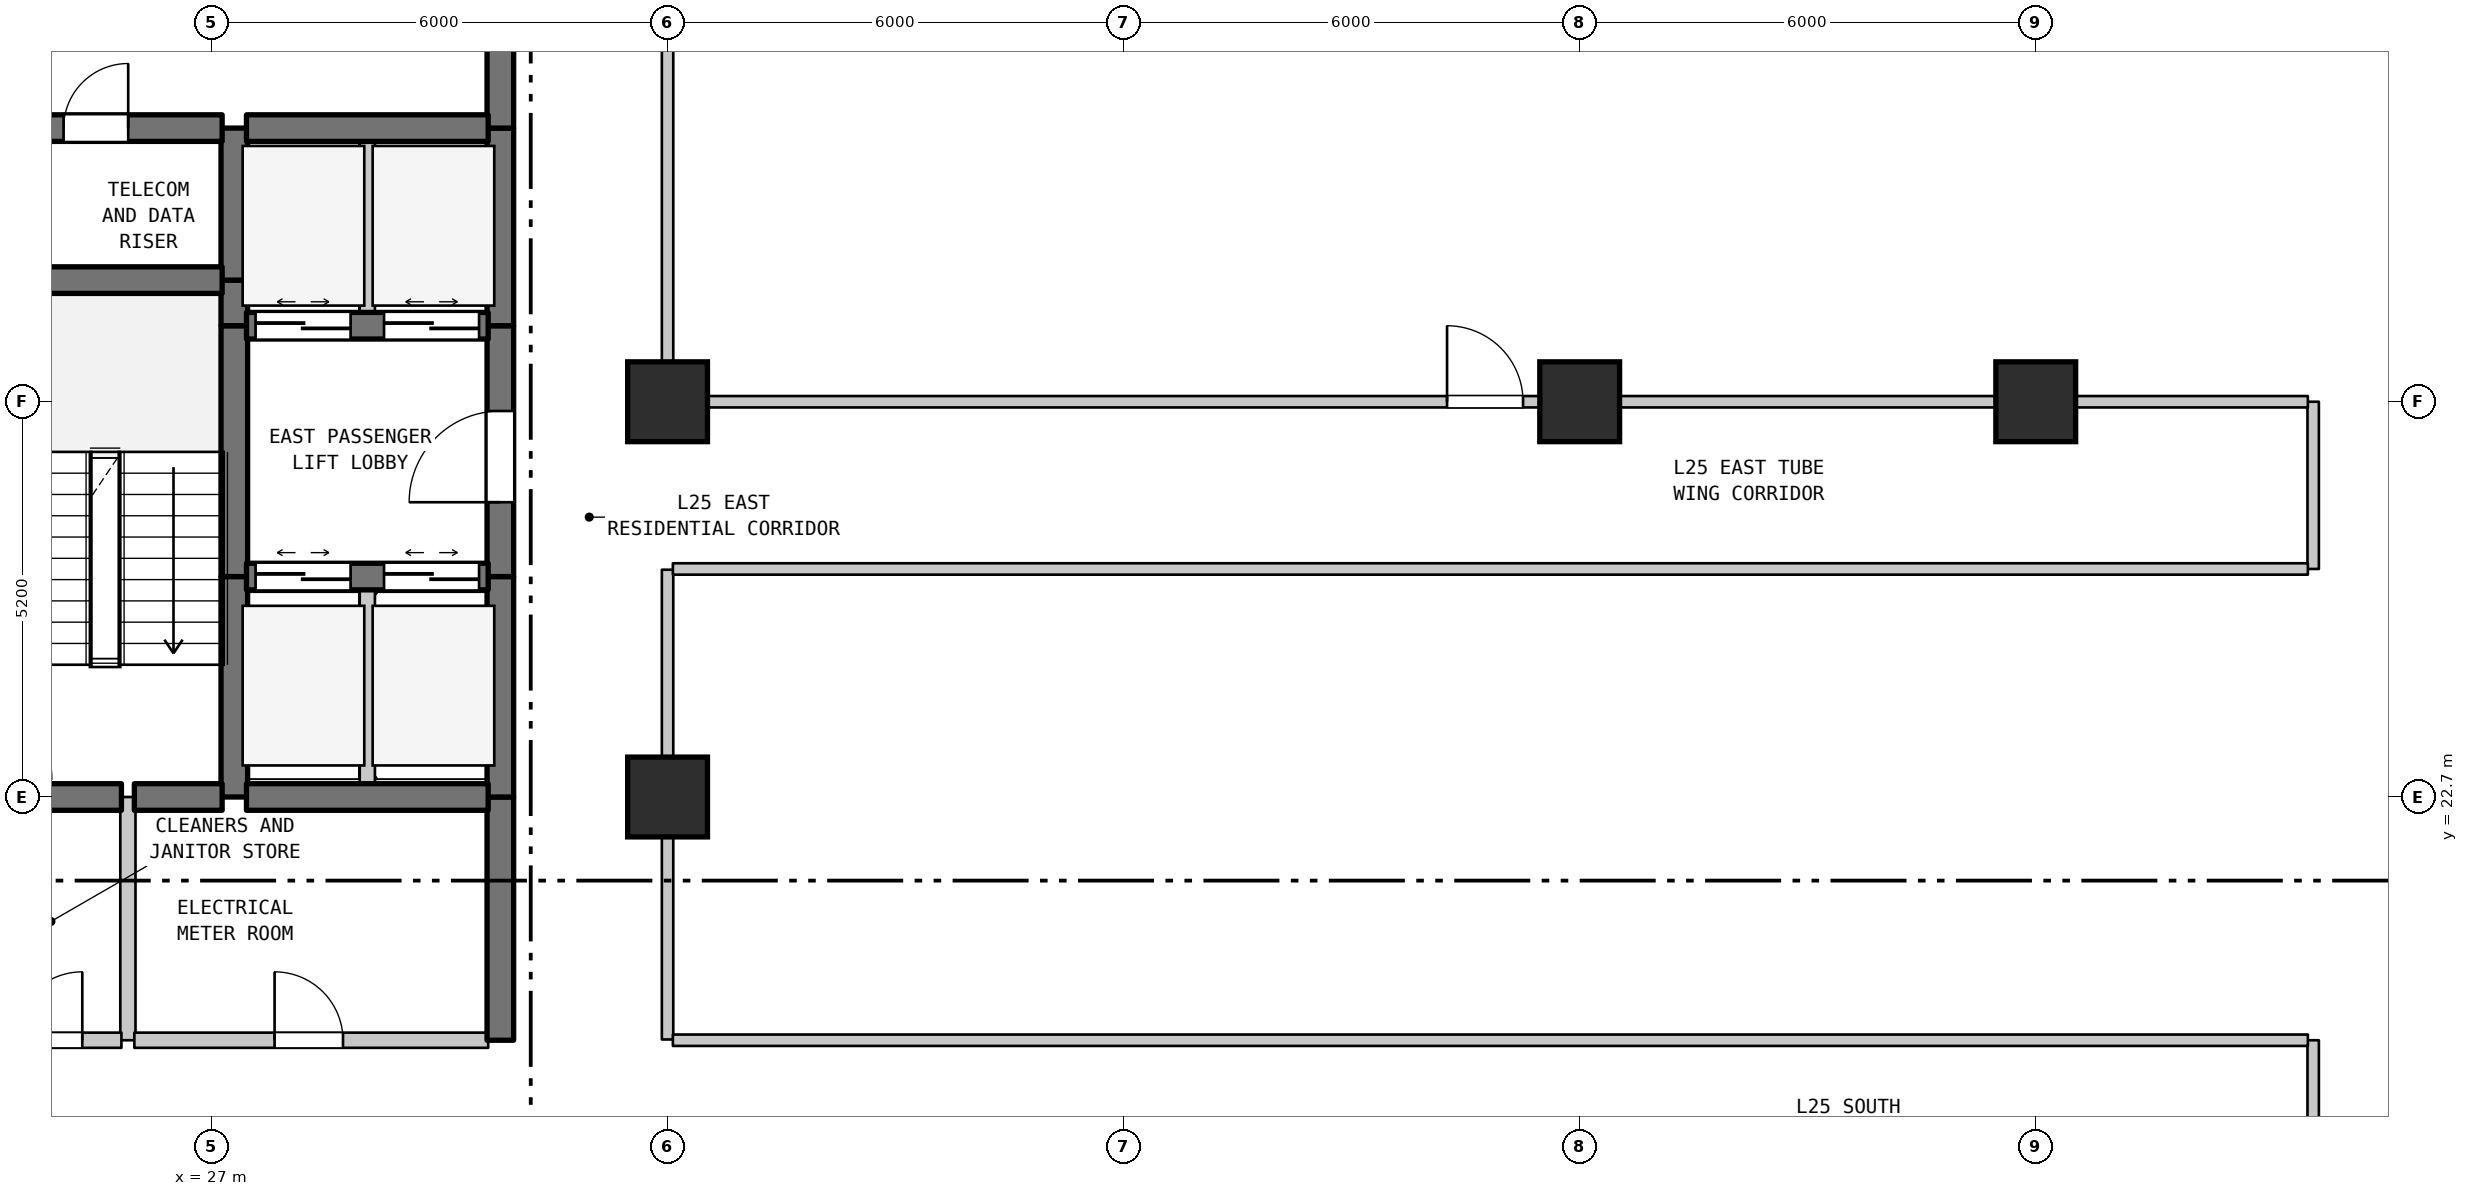
"""IFC4 building model, lengths in metres.
Left out: names, types, materials, properties, quantities, classifications, styles, units other than length and angle.
Written with IfcOpenShell. Run it as: python <this file> out.ifc"""

import sys

from ifc_helpers import new_model, si_unit, direction, frame, frame_2d, origin, origin_2d, place, context, subcontext, project, spatial, rectangle, extrude, element, fill, save


model = new_model("IFC4")
c1 = context("Model", 3, precision=1e-05, world=origin(), true_north=direction((0.0, 1.0)))
c2 = subcontext(c1, "Body", "Model", "MODEL_VIEW")
j1 = project(units=[si_unit("LENGTHUNIT", "METRE"), si_unit("PLANEANGLEUNIT", "RADIAN")], contexts=[c1])
p1 = place(None, origin())
s1 = spatial("IfcSite", under=j1, at=p1, CompositionType="ELEMENT")
p2 = place(p1, origin())
s2 = spatial("IfcBuilding", under=s1, at=p2, CompositionType="ELEMENT")
p3 = place(p2, frame((0.0, 0.0, 105.7)))
s3 = spatial("IfcBuildingStorey", under=s2, at=p3, CompositionType="ELEMENT", Elevation=105.7)
for number, where, z_axis, x_axis in (
    (1, (33.0, 22.7, 0.0), (0.0, 0.0, 1.0), (1.0, 0.0, 0.0)),
    (2, (33.0, 27.9, 0.0), (0.0, 0.0, 1.0), (1.0, 0.0, 0.0)),
    (3, (45.0, 27.9, 0.0), (0.0, 0.0, 1.0), (1.0, 0.0, 0.0)),
    (4, (51.0, 27.9, 0.0), (0.0, 0.0, 1.0), (1.0, 0.0, 0.0)),
):
    element("IfcColumn", number, at=place(p3, frame(where, z_axis=z_axis, x_axis=x_axis)), inside=s3, PredefinedType="COLUMN", context=c2, shape_type="SweptSolid", body=[
        extrude(rectangle(XDim=1.05, YDim=1.05, at=origin_2d()), origin(), (0.0, 0.0, 1.0), 3.7),
    ])
p4 = place(p3, frame((25.9, 19.5, 0.0), z_axis=(0.0, 0.0, 1.0), x_axis=(0.0, 1.0, 0.0)))
e5 = element("IfcWall", 5, at=p4, inside=s3, PredefinedType="STANDARD", context=c2, shape_type="SweptSolid", body=[
    extrude(rectangle(XDim=3.2, YDim=0.2, at=frame_2d((1.6, 0.0))), origin(), (0.0, 0.0, 1.0), 3.385),
])
p5 = place(p3, frame((27.3, 22.7, 0.0), z_axis=(0.0, 0.0, 1.0), x_axis=(0.0, 1.0, 0.0)))
e6 = element("IfcWall", 6, at=p5, inside=s3, PredefinedType="SHEAR", context=c2, shape_type="SweptSolid", body=[
    extrude(rectangle(XDim=2.9, YDim=0.35, at=frame_2d((1.45, 0.0))), origin(), (0.0, 0.0, 1.0), 3.385),
])
p6 = place(p3, frame((27.3, 25.6, 0.0), z_axis=(0.0, 0.0, 1.0), x_axis=(0.0, 1.0, 0.0)))
e7 = element("IfcWall", 7, at=p6, inside=s3, PredefinedType="SHEAR", context=c2, shape_type="SweptSolid", body=[
    extrude(rectangle(XDim=3.3, YDim=0.35, at=frame_2d((1.65, 0.0))), origin(), (0.0, 0.0, 1.0), 3.385),
])
p7 = place(p3, frame((27.3, 28.9, 0.0), z_axis=(0.0, 0.0, 1.0), x_axis=(0.0, 1.0, 0.0)))
e8 = element("IfcWall", 8, at=p7, inside=s3, PredefinedType="SHEAR", context=c2, shape_type="SweptSolid", body=[
    extrude(rectangle(XDim=0.6, YDim=0.35, at=frame_2d((0.3, 0.0))), origin(), (0.0, 0.0, 1.0), 3.385),
])
p8 = place(p3, frame((27.3, 29.5, 0.0), z_axis=(0.0, 0.0, 1.0), x_axis=(0.0, 1.0, 0.0)))
e9 = element("IfcWall", 9, at=p8, inside=s3, PredefinedType="SHEAR", context=c2, shape_type="SweptSolid", body=[
    extrude(rectangle(XDim=2.0, YDim=0.35, at=frame_2d((1.0, 0.0))), origin(), (0.0, 0.0, 1.0), 3.385),
])
p9 = place(p3, frame((29.05, 22.7, 0.0), z_axis=(0.0, 0.0, 1.0), x_axis=(0.0, 1.0, 0.0)))
e10 = element("IfcWall", 10, at=p9, inside=s3, PredefinedType="STANDARD", context=c2, shape_type="SweptSolid", body=[
    extrude(rectangle(XDim=2.9, YDim=0.2, at=frame_2d((1.45, 0.0))), origin(), (0.0, 0.0, 1.0), 3.385),
])
p10 = place(p3, frame((29.05, 28.9, 0.0), z_axis=(0.0, 0.0, 1.0), x_axis=(0.0, 1.0, 0.0)))
e11 = element("IfcWall", 11, at=p10, inside=s3, PredefinedType="STANDARD", context=c2, shape_type="SweptSolid", body=[
    extrude(rectangle(XDim=2.6, YDim=0.2, at=frame_2d((1.3, 0.0))), origin(), (0.0, 0.0, 1.0), 3.385),
])
p11 = place(p3, frame((30.8, 19.5, 0.0), z_axis=(0.0, 0.0, 1.0), x_axis=(0.0, 1.0, 0.0)))
e12 = element("IfcWall", 12, at=p11, inside=s3, PredefinedType="SHEAR", context=c2, shape_type="SweptSolid", body=[
    extrude(rectangle(XDim=3.2, YDim=0.35, at=frame_2d((1.6, 0.0))), origin(), (0.0, 0.0, 1.0), 3.385),
])
p12 = place(p3, frame((30.8, 22.7, 0.0), z_axis=(0.0, 0.0, 1.0), x_axis=(0.0, 1.0, 0.0)))
e13 = element("IfcWall", 13, at=p12, inside=s3, PredefinedType="SHEAR", context=c2, shape_type="SweptSolid", body=[
    extrude(rectangle(XDim=2.9, YDim=0.35, at=frame_2d((1.45, 0.0))), origin(), (0.0, 0.0, 1.0), 3.385),
])
p13 = place(p3, frame((30.8, 25.6, 0.0), z_axis=(0.0, 0.0, 1.0), x_axis=(0.0, 1.0, 0.0)))
e14 = element("IfcWall", 14, at=p13, inside=s3, PredefinedType="SHEAR", context=c2, shape_type="SweptSolid", body=[
    extrude(rectangle(XDim=3.3, YDim=0.35, at=frame_2d((1.65, 0.0))), origin(), (0.0, 0.0, 1.0), 3.385),
])
p14 = place(p13, frame((0.978, 0.0, 0.0)))
e15 = element("IfcOpeningElement", 15, at=p14, cuts=e14, PredefinedType="OPENING", context=c2, shape_type="SweptSolid", body=[
    extrude(rectangle(XDim=1.2, YDim=2.2, at=frame_2d((0.6, 1.1))), frame((0.0, 0.185, 0.0), z_axis=(0.0, -1.0, 0.0), x_axis=(1.0, 0.0, 0.0)), (0.0, 0.0, 1.0), 0.37),
])
p15 = place(p3, frame((30.8, 28.9, 0.0), z_axis=(0.0, 0.0, 1.0), x_axis=(0.0, 1.0, 0.0)))
e16 = element("IfcWall", 16, at=p15, inside=s3, PredefinedType="SHEAR", context=c2, shape_type="SweptSolid", body=[
    extrude(rectangle(XDim=2.6, YDim=0.35, at=frame_2d((1.3, 0.0))), origin(), (0.0, 0.0, 1.0), 3.385),
])
p16 = place(p3, frame((30.8, 31.5, 0.0), z_axis=(0.0, 0.0, 1.0), x_axis=(0.0, 1.0, 0.0)))
e17 = element("IfcWall", 17, at=p16, inside=s3, PredefinedType="SHEAR", context=c2, shape_type="SweptSolid", body=[
    extrude(rectangle(XDim=3.5, YDim=0.35, at=frame_2d((1.75, 0.0))), origin(), (0.0, 0.0, 1.0), 3.385),
])
p17 = place(p16, frame((1.15, 0.0, 0.0)))
e18 = element("IfcOpeningElement", 18, at=p17, cuts=e17, PredefinedType="OPENING", context=c2, shape_type="SweptSolid", body=[
    extrude(rectangle(XDim=1.2, YDim=2.2, at=frame_2d((0.6, 1.1))), frame((0.0, 0.185, 0.0), z_axis=(0.0, -1.0, 0.0), x_axis=(1.0, 0.0, 0.0)), (0.0, 0.0, 1.0), 0.37),
])
p18 = place(p3, frame((33.0, 19.51, 0.0), z_axis=(0.0, 0.0, 1.0), x_axis=(0.0, 1.0, 0.0)))
e19 = element("IfcWall", 19, at=p18, inside=s3, PredefinedType="STANDARD", context=c2, shape_type="SweptSolid", body=[
    extrude(rectangle(XDim=6.18, YDim=0.15, at=frame_2d((3.09, 0.0))), origin(), (0.0, 0.0, 1.0), 2.935),
])
p19 = place(p3, frame((33.0, 27.91, 0.0), z_axis=(0.0, 0.0, 1.0), x_axis=(0.0, 1.0, 0.0)))
e20 = element("IfcWall", 20, at=p19, inside=s3, PredefinedType="STANDARD", context=c2, shape_type="SweptSolid", body=[
    extrude(rectangle(XDim=9.98, YDim=0.15, at=frame_2d((4.99, 0.0))), origin(), (0.0, 0.0, 1.0), 2.885),
])
p20 = place(p3, frame((54.65, 17.31, 0.0), z_axis=(0.0, 0.0, 1.0), x_axis=(0.0, 1.0, 0.0)))
e21 = element("IfcWall", 21, at=p20, inside=s3, PredefinedType="STANDARD", context=c2, shape_type="SweptSolid", body=[
    extrude(rectangle(XDim=2.19, YDim=0.15, at=frame_2d((1.095, 0.0))), origin(), (0.0, 0.0, 1.0), 3.385),
])
p21 = place(p3, frame((54.65, 25.7, 0.0), z_axis=(0.0, 0.0, 1.0), x_axis=(0.0, 1.0, 0.0)))
e22 = element("IfcWall", 22, at=p21, inside=s3, PredefinedType="STANDARD", context=c2, shape_type="SweptSolid", body=[
    extrude(rectangle(XDim=2.2, YDim=0.15, at=frame_2d((1.1, 0.0))), origin(), (0.0, 0.0, 1.0), 3.385),
])
p22 = place(p3, frame((23.96, 19.5, 0.0), z_axis=(0.0, 0.0, 1.0), x_axis=(1.0, 0.0, 0.0)))
e23 = element("IfcWall", 23, at=p22, inside=s3, PredefinedType="STANDARD", context=c2, shape_type="SweptSolid", body=[
    extrude(rectangle(XDim=1.855, YDim=0.2, at=frame_2d((0.927, 0.0))), origin(), (0.0, 0.0, 1.0), 3.385),
])
p23 = place(p22, frame((0.44, 0.0, 0.0)))
e24 = element("IfcOpeningElement", 24, at=p23, cuts=e23, PredefinedType="OPENING", context=c2, shape_type="SweptSolid", body=[
    extrude(rectangle(XDim=0.9, YDim=2.15, at=frame_2d((0.45, 1.075))), frame((0.0, 0.11, 0.0), z_axis=(0.0, -1.0, 0.0), x_axis=(1.0, 0.0, 0.0)), (0.0, 0.0, 1.0), 0.22),
])
p24 = place(p3, frame((25.985, 19.5, 0.0), z_axis=(0.0, 0.0, 1.0), x_axis=(1.0, 0.0, 0.0)))
e25 = element("IfcWall", 25, at=p24, inside=s3, PredefinedType="STANDARD", context=c2, shape_type="SweptSolid", body=[
    extrude(rectangle(XDim=4.655, YDim=0.2, at=frame_2d((2.327, 0.0))), origin(), (0.0, 0.0, 1.0), 3.385),
])
p25 = place(p24, frame((1.845, 0.0, 0.0)))
e26 = element("IfcOpeningElement", 26, at=p25, cuts=e25, PredefinedType="OPENING", context=c2, shape_type="SweptSolid", body=[
    extrude(rectangle(XDim=0.9, YDim=2.15, at=frame_2d((0.45, 1.075))), frame((0.0, 0.11, 0.0), z_axis=(0.0, -1.0, 0.0), x_axis=(1.0, 0.0, 0.0)), (0.0, 0.0, 1.0), 0.22),
])
p26 = place(p3, frame((33.07, 19.5, 0.0), z_axis=(0.0, 0.0, 1.0), x_axis=(1.0, 0.0, 0.0)))
e27 = element("IfcWall", 27, at=p26, inside=s3, PredefinedType="STANDARD", context=c2, shape_type="SweptSolid", body=[
    extrude(rectangle(XDim=21.51, YDim=0.15, at=frame_2d((10.755, 0.0))), origin(), (0.0, 0.0, 1.0), 3.385),
])
p27 = place(p3, frame((23.96, 22.7, 0.0), z_axis=(0.0, 0.0, 1.0), x_axis=(1.0, 0.0, 0.0)))
e28 = element("IfcWall", 28, at=p27, inside=s3, PredefinedType="SHEAR", context=c2, shape_type="SweptSolid", body=[
    extrude(rectangle(XDim=1.855, YDim=0.35, at=frame_2d((0.927, 0.0))), origin(), (0.0, 0.0, 1.0), 3.385),
])
p28 = place(p3, frame((25.985, 22.7, 0.0), z_axis=(0.0, 0.0, 1.0), x_axis=(1.0, 0.0, 0.0)))
e29 = element("IfcWall", 29, at=p28, inside=s3, PredefinedType="SHEAR", context=c2, shape_type="SweptSolid", body=[
    extrude(rectangle(XDim=1.155, YDim=0.35, at=frame_2d((0.577, 0.0))), origin(), (0.0, 0.0, 1.0), 3.385),
])
p29 = place(p3, frame((27.46, 22.7, 0.0), z_axis=(0.0, 0.0, 1.0), x_axis=(1.0, 0.0, 0.0)))
e30 = element("IfcWall", 30, at=p29, inside=s3, PredefinedType="SHEAR", context=c2, shape_type="SweptSolid", body=[
    extrude(rectangle(XDim=3.18, YDim=0.35, at=frame_2d((1.59, 0.0))), origin(), (0.0, 0.0, 1.0), 3.385),
])
p30 = place(p3, frame((27.46, 25.6, 0.0), z_axis=(0.0, 0.0, 1.0), x_axis=(1.0, 0.0, 0.0)))
e31 = element("IfcWall", 31, at=p30, inside=s3, PredefinedType="SHEAR", context=c2, shape_type="SweptSolid", body=[
    extrude(rectangle(XDim=3.18, YDim=0.35, at=frame_2d((1.59, 0.0))), origin(), (0.0, 0.0, 1.0), 3.385),
])
p31 = place(p30, frame((0.12, 0.0, 0.0)))
e32 = element("IfcOpeningElement", 32, at=p31, cuts=e31, PredefinedType="OPENING", context=c2, shape_type="SweptSolid", body=[
    extrude(rectangle(XDim=1.25, YDim=2.2, at=frame_2d((0.625, 1.1))), frame((0.0, 0.185, 0.0), z_axis=(0.0, -1.0, 0.0), x_axis=(1.0, 0.0, 0.0)), (0.0, 0.0, 1.0), 0.37),
])
p32 = place(p30, frame((1.81, 0.0, 0.0)))
e33 = element("IfcOpeningElement", 33, at=p32, cuts=e31, PredefinedType="OPENING", context=c2, shape_type="SweptSolid", body=[
    extrude(rectangle(XDim=1.25, YDim=2.2, at=frame_2d((0.625, 1.1))), frame((0.0, 0.185, 0.0), z_axis=(0.0, -1.0, 0.0), x_axis=(1.0, 0.0, 0.0)), (0.0, 0.0, 1.0), 0.37),
])
p33 = place(p3, frame((33.07, 25.7, 0.0), z_axis=(0.0, 0.0, 1.0), x_axis=(1.0, 0.0, 0.0)))
e34 = element("IfcWall", 34, at=p33, inside=s3, PredefinedType="STANDARD", context=c2, shape_type="SweptSolid", body=[
    extrude(rectangle(XDim=21.51, YDim=0.15, at=frame_2d((10.755, 0.0))), origin(), (0.0, 0.0, 1.0), 3.385),
])
p34 = place(p3, frame((33.07, 27.9, 0.0), z_axis=(0.0, 0.0, 1.0), x_axis=(1.0, 0.0, 0.0)))
e35 = element("IfcWall", 35, at=p34, inside=s3, PredefinedType="STANDARD", context=c2, shape_type="SweptSolid", body=[
    extrude(rectangle(XDim=11.93, YDim=0.15, at=frame_2d((5.965, 0.0))), origin(), (0.0, 0.0, 1.0), 2.885),
])
p35 = place(p34, frame((10.185, 0.0, 0.0)))
e36 = element("IfcOpeningElement", 36, at=p35, cuts=e35, PredefinedType="OPENING", context=c2, shape_type="SweptSolid", body=[
    extrude(rectangle(XDim=1.0, YDim=2.15, at=frame_2d((0.5, 1.075))), frame((0.0, 0.085, 0.0), z_axis=(0.0, -1.0, 0.0), x_axis=(1.0, 0.0, 0.0)), (0.0, 0.0, 1.0), 0.17),
])
p36 = place(p3, frame((27.46, 28.9, 0.0), z_axis=(0.0, 0.0, 1.0), x_axis=(1.0, 0.0, 0.0)))
e37 = element("IfcWall", 37, at=p36, inside=s3, PredefinedType="SHEAR", context=c2, shape_type="SweptSolid", body=[
    extrude(rectangle(XDim=3.18, YDim=0.35, at=frame_2d((1.59, 0.0))), origin(), (0.0, 0.0, 1.0), 3.385),
])
p37 = place(p36, frame((0.12, 0.0, 0.0)))
e38 = element("IfcOpeningElement", 38, at=p37, cuts=e37, PredefinedType="OPENING", context=c2, shape_type="SweptSolid", body=[
    extrude(rectangle(XDim=1.25, YDim=2.2, at=frame_2d((0.625, 1.1))), frame((0.0, 0.185, 0.0), z_axis=(0.0, -1.0, 0.0), x_axis=(1.0, 0.0, 0.0)), (0.0, 0.0, 1.0), 0.37),
])
p38 = place(p36, frame((1.81, 0.0, 0.0)))
e39 = element("IfcOpeningElement", 39, at=p38, cuts=e37, PredefinedType="OPENING", context=c2, shape_type="SweptSolid", body=[
    extrude(rectangle(XDim=1.25, YDim=2.2, at=frame_2d((0.625, 1.1))), frame((0.0, 0.185, 0.0), z_axis=(0.0, -1.0, 0.0), x_axis=(1.0, 0.0, 0.0)), (0.0, 0.0, 1.0), 0.37),
])
p39 = place(p3, frame((23.96, 29.5, 0.0), z_axis=(0.0, 0.0, 1.0), x_axis=(1.0, 0.0, 0.0)))
e40 = element("IfcWall", 40, at=p39, inside=s3, PredefinedType="SHEAR", context=c2, shape_type="SweptSolid", body=[
    extrude(rectangle(XDim=3.18, YDim=0.35, at=frame_2d((1.59, 0.0))), origin(), (0.0, 0.0, 1.0), 3.385),
])
p40 = place(p3, frame((23.96, 31.5, 0.0), z_axis=(0.0, 0.0, 1.0), x_axis=(1.0, 0.0, 0.0)))
e41 = element("IfcWall", 41, at=p40, inside=s3, PredefinedType="SHEAR", context=c2, shape_type="SweptSolid", body=[
    extrude(rectangle(XDim=3.18, YDim=0.35, at=frame_2d((1.59, 0.0))), origin(), (0.0, 0.0, 1.0), 3.385),
])
p41 = place(p40, frame((1.094, 0.0, 0.0)))
e42 = element("IfcOpeningElement", 42, at=p41, cuts=e41, PredefinedType="OPENING", context=c2, shape_type="SweptSolid", body=[
    extrude(rectangle(XDim=0.85, YDim=2.1, at=frame_2d((0.425, 1.05))), frame((0.0, 0.185, 0.0), z_axis=(0.0, -1.0, 0.0), x_axis=(1.0, 0.0, 0.0)), (0.0, 0.0, 1.0), 0.37),
])
p42 = place(p3, frame((27.46, 31.5, 0.0), z_axis=(0.0, 0.0, 1.0), x_axis=(1.0, 0.0, 0.0)))
e43 = element("IfcWall", 43, at=p42, inside=s3, PredefinedType="SHEAR", context=c2, shape_type="SweptSolid", body=[
    extrude(rectangle(XDim=3.18, YDim=0.35, at=frame_2d((1.59, 0.0))), origin(), (0.0, 0.0, 1.0), 3.385),
])
p43 = place(p3, frame((45.0, 27.9, 0.0), z_axis=(0.0, 0.0, 1.0), x_axis=(1.0, 0.0, 0.0)))
e44 = element("IfcWall", 44, at=p43, inside=s3, PredefinedType="STANDARD", context=c2, shape_type="SweptSolid", body=[
    extrude(rectangle(XDim=9.58, YDim=0.15, at=frame_2d((4.79, 0.0))), origin(), (0.0, 0.0, 1.0), 2.935),
])
p44 = place(p14, origin())
e45 = element("IfcDoor", 45, at=p44, inside=s3, OperationType="SINGLE_SWING_LEFT", PredefinedType="DOOR", context=c2, shape_type="SweptSolid", body=[
    extrude(rectangle(XDim=1.2, YDim=2.2, at=frame_2d((0.6, 1.1))), frame((0.0, 0.025, 0.0), z_axis=(0.0, -1.0, 0.0), x_axis=(1.0, 0.0, 0.0)), (0.0, 0.0, 1.0), 0.05),
])
fill(e15, e45)
p45 = place(p23, origin())
e46 = element("IfcDoor", 46, at=p45, inside=s3, OperationType="SINGLE_SWING_RIGHT", PredefinedType="DOOR", context=c2, shape_type="SweptSolid", body=[
    extrude(rectangle(XDim=0.9, YDim=2.15, at=frame_2d((0.45, 1.075))), frame((0.0, 0.025, 0.0), z_axis=(0.0, -1.0, 0.0), x_axis=(1.0, 0.0, 0.0)), (0.0, 0.0, 1.0), 0.05),
])
fill(e24, e46)
p46 = place(p25, origin())
e47 = element("IfcDoor", 47, at=p46, inside=s3, OperationType="SINGLE_SWING_LEFT", PredefinedType="DOOR", context=c2, shape_type="SweptSolid", body=[
    extrude(rectangle(XDim=0.9, YDim=2.15, at=frame_2d((0.45, 1.075))), frame((0.0, 0.025, 0.0), z_axis=(0.0, -1.0, 0.0), x_axis=(1.0, 0.0, 0.0)), (0.0, 0.0, 1.0), 0.05),
])
fill(e26, e47)
p47 = place(p31, origin())
e48 = element("IfcDoor", 48, at=p47, inside=s3, OperationType="DOUBLE_DOOR_SLIDING", PredefinedType="DOOR", context=c2, shape_type="SweptSolid", body=[
    extrude(rectangle(XDim=1.25, YDim=2.2, at=frame_2d((0.625, 1.1))), frame((0.0, 0.025, 0.0), z_axis=(0.0, -1.0, 0.0), x_axis=(1.0, 0.0, 0.0)), (0.0, 0.0, 1.0), 0.05),
])
fill(e32, e48)
p48 = place(p32, origin())
e49 = element("IfcDoor", 49, at=p48, inside=s3, OperationType="DOUBLE_DOOR_SLIDING", PredefinedType="DOOR", context=c2, shape_type="SweptSolid", body=[
    extrude(rectangle(XDim=1.25, YDim=2.2, at=frame_2d((0.625, 1.1))), frame((0.0, 0.025, 0.0), z_axis=(0.0, -1.0, 0.0), x_axis=(1.0, 0.0, 0.0)), (0.0, 0.0, 1.0), 0.05),
])
fill(e33, e49)
p49 = place(p35, origin())
e50 = element("IfcDoor", 50, at=p49, inside=s3, OperationType="SINGLE_SWING_LEFT", PredefinedType="DOOR", context=c2, shape_type="SweptSolid", body=[
    extrude(rectangle(XDim=1.0, YDim=2.15, at=frame_2d((0.5, 1.075))), frame((0.0, 0.025, 0.0), z_axis=(0.0, -1.0, 0.0), x_axis=(1.0, 0.0, 0.0)), (0.0, 0.0, 1.0), 0.05),
])
fill(e36, e50)
p50 = place(p37, origin())
e51 = element("IfcDoor", 51, at=p50, inside=s3, OperationType="DOUBLE_DOOR_SLIDING", PredefinedType="DOOR", context=c2, shape_type="SweptSolid", body=[
    extrude(rectangle(XDim=1.25, YDim=2.2, at=frame_2d((0.625, 1.1))), frame((0.0, 0.025, 0.0), z_axis=(0.0, -1.0, 0.0), x_axis=(1.0, 0.0, 0.0)), (0.0, 0.0, 1.0), 0.05),
])
fill(e38, e51)
p51 = place(p38, origin())
e52 = element("IfcDoor", 52, at=p51, inside=s3, OperationType="DOUBLE_DOOR_SLIDING", PredefinedType="DOOR", context=c2, shape_type="SweptSolid", body=[
    extrude(rectangle(XDim=1.25, YDim=2.2, at=frame_2d((0.625, 1.1))), frame((0.0, 0.025, 0.0), z_axis=(0.0, -1.0, 0.0), x_axis=(1.0, 0.0, 0.0)), (0.0, 0.0, 1.0), 0.05),
])
fill(e39, e52)
p52 = place(p41, origin())
e53 = element("IfcDoor", 53, at=p52, inside=s3, OperationType="SINGLE_SWING_RIGHT", PredefinedType="DOOR", context=c2, shape_type="SweptSolid", body=[
    extrude(rectangle(XDim=0.85, YDim=2.1, at=frame_2d((0.425, 1.05))), frame((0.0, 0.025, 0.0), z_axis=(0.0, -1.0, 0.0), x_axis=(1.0, 0.0, 0.0)), (0.0, 0.0, 1.0), 0.05),
])
fill(e42, e53)
save(model, sys.argv[1])
